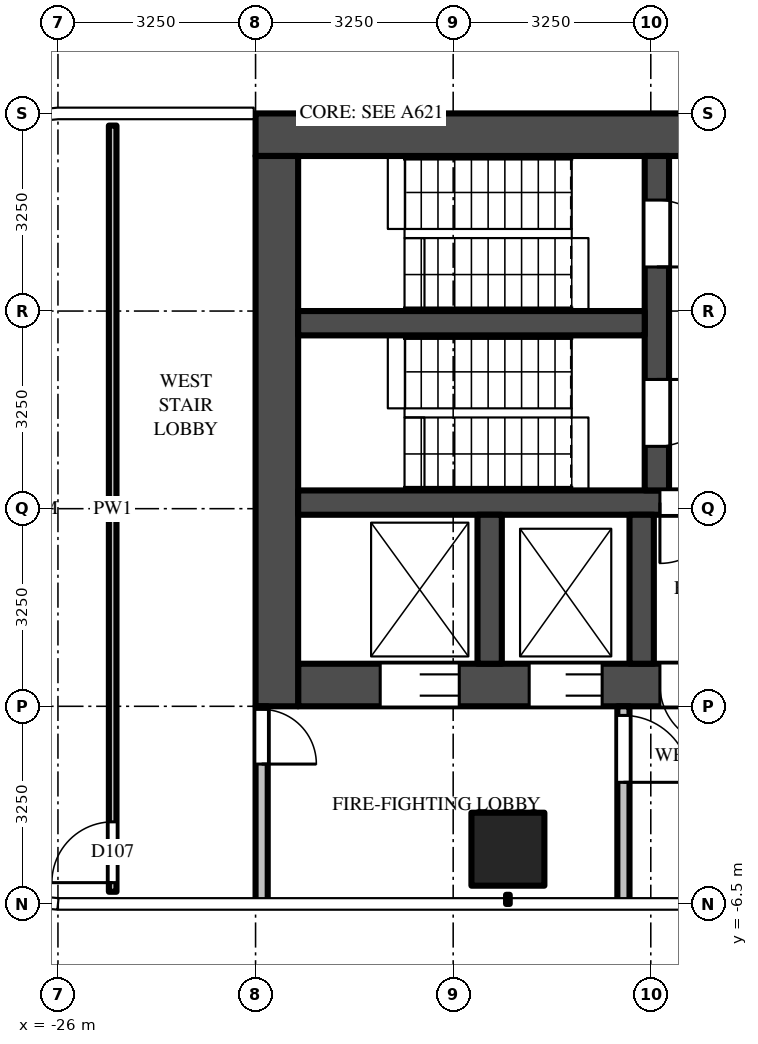
"""IFC4 building model, lengths in metres.
Left out: names, types, materials, properties, quantities, classifications, styles, units other than length and angle.
Written with IfcOpenShell. Run it as: python <this file> out.ifc"""

import sys

from ifc_helpers import new_model, si_unit, direction, frame, frame_2d, origin, origin_2d, place, context, subcontext, project, spatial, rectangle, extrude, source, transform, mapped, element, fill, save


model = new_model("IFC4")
c1 = context("Model", 3, precision=1e-05, world=origin(), true_north=direction((0.0, 1.0)))
c2 = subcontext(c1, "Body", "Model", "MODEL_VIEW")
j1 = project(units=[si_unit("LENGTHUNIT", "METRE"), si_unit("PLANEANGLEUNIT", "RADIAN")], contexts=[c1])
p1 = place(None, origin())
s1 = spatial("IfcSite", under=j1, at=p1, CompositionType="ELEMENT")
p2 = place(p1, origin())
s2 = spatial("IfcBuilding", under=s1, at=p2, CompositionType="ELEMENT")
p3 = place(p2, frame((0.0, 0.0, 181.5)))
s3 = spatial("IfcBuildingStorey", under=s2, at=p3, CompositionType="ELEMENT", Elevation=181.5)
m1 = source(origin(), c2, "Body", "SweptSolid", [
    extrude(rectangle(XDim=1.2, YDim=1.2, at=origin_2d()), origin(), (0.0, 0.0, 1.0), 3.9),
])
p4 = place(p3, frame((-18.6, -5.6, 0.0), z_axis=(0.0, 0.0, 1.0), x_axis=(1.0, 0.0, 0.0)))
e1 = element("IfcColumn", 1, at=p4, inside=s3, PredefinedType="COLUMN", context=c2, shape_type="MappedRepresentation", body=[
    mapped(m1, transform((0.0, 0.0, 0.0))),
])
m2 = source(origin(), c2, "Body", "SweptSolid", [
    extrude(rectangle(XDim=16.55, YDim=0.7, at=frame_2d((8.275, 0.0))), origin(), (0.0, 0.0, 1.0), 3.7),
])
p5 = place(p3, frame((-6.2, 6.15, 0.0), z_axis=(0.0, 0.0, 1.0), x_axis=(-1.0, 0.0, 0.0)))
e2 = element("IfcWall", 2, at=p5, inside=s3, PredefinedType="SHEAR", context=c2, shape_type="MappedRepresentation", body=[
    mapped(m2, transform((0.0, 0.0, 0.0))),
])
m3 = source(origin(), c2, "Body", "SweptSolid", [
    extrude(rectangle(XDim=14.85, YDim=0.7, at=frame_2d((7.425, 0.0))), origin(), (0.0, 0.0, 1.0), 3.7),
])
p6 = place(p3, frame((-7.2, -2.9, 0.0), z_axis=(0.0, 0.0, 1.0), x_axis=(-1.0, 0.0, 0.0)))
e3 = element("IfcWall", 3, at=p6, inside=s3, PredefinedType="SHEAR", context=c2, shape_type="MappedRepresentation", body=[
    mapped(m3, transform((0.0, 0.0, 0.0))),
])
m4 = source(origin(), c2, "Body", "SweptSolid", [
    extrude(rectangle(XDim=1.1, YDim=2.1, at=frame_2d((0.55, 1.05))), frame((0.0, 0.36, 0.0), z_axis=(0.0, -1.0, 0.0), x_axis=(1.0, 0.0, 0.0)), (0.0, 0.0, 1.0), 0.72),
])
p7 = place(p6, frame((0.55, 0.0, 0.0)))
e4 = element("IfcOpeningElement", 4, at=p7, cuts=e3, PredefinedType="OPENING", context=c2, shape_type="MappedRepresentation", body=[
    mapped(m4, transform((0.0, 0.0, 0.0))),
])
p8 = place(p6, frame((3.15, 0.0, 0.0)))
e5 = element("IfcOpeningElement", 5, at=p8, cuts=e3, PredefinedType="OPENING", context=c2, shape_type="MappedRepresentation", body=[
    mapped(m4, transform((0.0, 0.0, 0.0))),
])
m5 = source(origin(), c2, "Body", "SweptSolid", [
    extrude(rectangle(XDim=1.2, YDim=2.1, at=frame_2d((0.6, 1.05))), frame((0.0, 0.36, 0.0), z_axis=(0.0, -1.0, 0.0), x_axis=(1.0, 0.0, 0.0)), (0.0, 0.0, 1.0), 0.72),
])
p9 = place(p6, frame((5.7, 0.0, 0.0)))
e6 = element("IfcOpeningElement", 6, at=p9, cuts=e3, PredefinedType="OPENING", context=c2, shape_type="MappedRepresentation", body=[
    mapped(m5, transform((0.0, 0.0, 0.0))),
])
m6 = source(origin(), c2, "Body", "SweptSolid", [
    extrude(rectangle(XDim=1.3, YDim=2.1, at=frame_2d((0.65, 1.05))), frame((0.0, 0.36, 0.0), z_axis=(0.0, -1.0, 0.0), x_axis=(1.0, 0.0, 0.0)), (0.0, 0.0, 1.0), 0.72),
])
p10 = place(p6, frame((12.2, 0.0, 0.0)))
e7 = element("IfcOpeningElement", 7, at=p10, cuts=e3, PredefinedType="OPENING", context=c2, shape_type="MappedRepresentation", body=[
    mapped(m6, transform((0.0, 0.0, 0.0))),
])
p11 = place(p6, frame((9.85, 0.0, 0.0)))
e8 = element("IfcOpeningElement", 8, at=p11, cuts=e3, PredefinedType="OPENING", context=c2, shape_type="MappedRepresentation", body=[
    mapped(m5, transform((0.0, 0.0, 0.0))),
])
m7 = source(origin(), c2, "Body", "SweptSolid", [
    extrude(rectangle(XDim=1.0, YDim=2.1, at=frame_2d((0.5, 1.05))), frame((0.0, 0.36, 0.0), z_axis=(0.0, -1.0, 0.0), x_axis=(1.0, 0.0, 0.0)), (0.0, 0.0, 1.0), 0.72),
])
p12 = place(p6, frame((7.9, 0.0, 0.0)))
e9 = element("IfcOpeningElement", 9, at=p12, cuts=e3, PredefinedType="OPENING", context=c2, shape_type="MappedRepresentation", body=[
    mapped(m7, transform((0.0, 0.0, 0.0))),
])
m8 = source(origin(), c2, "Body", "SweptSolid", [
    extrude(rectangle(XDim=9.05, YDim=0.7, at=frame_2d((4.525, 0.0))), origin(), (0.0, 0.0, 1.0), 3.7),
])
p13 = place(p3, frame((-22.4, 5.8, 0.0), z_axis=(0.0, 0.0, 1.0), x_axis=(0.0, -1.0, 0.0)))
e10 = element("IfcWall", 10, at=p13, inside=s3, PredefinedType="SHEAR", context=c2, shape_type="MappedRepresentation", body=[
    mapped(m8, transform((0.0, 0.0, 0.0))),
])
m9 = source(origin(), c2, "Body", "SweptSolid", [
    extrude(rectangle(XDim=14.85, YDim=0.4, at=frame_2d((7.425, 0.0))), origin(), (0.0, 0.0, 1.0), 3.7),
])
p14 = place(p3, frame((-7.2, 0.1, 0.0), z_axis=(0.0, 0.0, 1.0), x_axis=(-1.0, 0.0, 0.0)))
e11 = element("IfcWall", 11, at=p14, inside=s3, PredefinedType="SHEAR", context=c2, shape_type="MappedRepresentation", body=[
    mapped(m9, transform((0.0, 0.0, 0.0))),
])
m10 = source(origin(), c2, "Body", "SweptSolid", [
    extrude(rectangle(XDim=1.0, YDim=2.1, at=frame_2d((0.5, 1.05))), frame((0.0, 0.21, 0.0), z_axis=(0.0, -1.0, 0.0), x_axis=(1.0, 0.0, 0.0)), (0.0, 0.0, 1.0), 0.42),
])
p15 = place(p14, frame((7.9, 0.0, 0.0)))
e12 = element("IfcOpeningElement", 12, at=p15, cuts=e11, PredefinedType="OPENING", context=c2, shape_type="MappedRepresentation", body=[
    mapped(m10, transform((0.0, 0.0, 0.0))),
])
m11 = source(origin(), c2, "Body", "SweptSolid", [
    extrude(rectangle(XDim=5.5, YDim=0.4, at=frame_2d((2.75, 0.0))), origin(), (0.0, 0.0, 1.0), 3.7),
])
p16 = place(p3, frame((-16.15, 5.8, 0.0), z_axis=(0.0, 0.0, 1.0), x_axis=(0.0, -1.0, 0.0)))
e13 = element("IfcWall", 13, at=p16, inside=s3, PredefinedType="SHEAR", context=c2, shape_type="MappedRepresentation", body=[
    mapped(m11, transform((0.0, 0.0, 0.0))),
])
m12 = source(origin(), c2, "Body", "SweptSolid", [
    extrude(rectangle(XDim=1.1, YDim=2.1, at=frame_2d((0.55, 1.05))), frame((0.0, 0.21, 0.0), z_axis=(0.0, -1.0, 0.0), x_axis=(1.0, 0.0, 0.0)), (0.0, 0.0, 1.0), 0.42),
])
p17 = place(p16, frame((0.725, 0.0, 0.0)))
e14 = element("IfcOpeningElement", 14, at=p17, cuts=e13, PredefinedType="OPENING", context=c2, shape_type="MappedRepresentation", body=[
    mapped(m12, transform((0.0, 0.0, 0.0))),
])
p18 = place(p16, frame((3.675, 0.0, 0.0)))
e15 = element("IfcOpeningElement", 15, at=p18, cuts=e13, PredefinedType="OPENING", context=c2, shape_type="MappedRepresentation", body=[
    mapped(m12, transform((0.0, 0.0, 0.0))),
])
m13 = source(origin(), c2, "Body", "SweptSolid", [
    extrude(rectangle(XDim=5.7, YDim=0.4, at=frame_2d((2.85, 0.0))), origin(), (0.0, 0.0, 1.0), 3.7),
])
p19 = place(p3, frame((-16.35, 3.05, 0.0), z_axis=(0.0, 0.0, 1.0), x_axis=(-1.0, 0.0, 0.0)))
e16 = element("IfcWall", 16, at=p19, inside=s3, PredefinedType="SHEAR", context=c2, shape_type="MappedRepresentation", body=[
    mapped(m13, transform((0.0, 0.0, 0.0))),
])
m14 = source(origin(), c2, "Body", "SweptSolid", [
    extrude(rectangle(XDim=2.45, YDim=0.4, at=frame_2d((1.225, 0.0))), origin(), (0.0, 0.0, 1.0), 3.7),
])
for number, where, z_axis, x_axis in (
    (17, (-16.4, -0.1, 0.0), (0.0, 0.0, 1.0), (0.0, -1.0, 0.0)),
    (18, (-18.9, -0.1, 0.0), (0.0, 0.0, 1.0), (0.0, -1.0, 0.0)),
):
    element("IfcWall", number, at=place(p3, frame(where, z_axis=z_axis, x_axis=x_axis)), inside=s3, PredefinedType="SHEAR", context=c2, shape_type="MappedRepresentation", body=[
        mapped(m14, transform((0.0, 0.0, 0.0))),
    ])
m15 = source(origin(), c2, "Body", "SweptSolid", [
    extrude(rectangle(XDim=3.25, YDim=0.2, at=frame_2d((1.625, 0.0))), origin(), (0.0, 0.0, 1.0), 3.7),
])
p20 = place(p3, frame((-16.7, -3.25, 0.0), z_axis=(0.0, 0.0, 1.0), x_axis=(0.0, -1.0, 0.0)))
e19 = element("IfcWall", 19, at=p20, inside=s3, PredefinedType="PARTITIONING", context=c2, shape_type="MappedRepresentation", body=[
    mapped(m15, transform((0.0, 0.0, 0.0))),
])
m16 = source(origin(), c2, "Body", "SweptSolid", [
    extrude(rectangle(XDim=1.1, YDim=2.1, at=frame_2d((0.55, 1.05))), frame((0.0, 0.11, 0.0), z_axis=(0.0, -1.0, 0.0), x_axis=(1.0, 0.0, 0.0)), (0.0, 0.0, 1.0), 0.22),
])
p21 = place(p20, frame((0.15, 0.0, 0.0)))
e20 = element("IfcOpeningElement", 20, at=p21, cuts=e19, PredefinedType="OPENING", context=c2, shape_type="MappedRepresentation", body=[
    mapped(m16, transform((0.0, 0.0, 0.0))),
])
p22 = place(p3, frame((-22.65, -3.25, 0.0), z_axis=(0.0, 0.0, 1.0), x_axis=(0.0, -1.0, 0.0)))
e21 = element("IfcWall", 21, at=p22, inside=s3, PredefinedType="PARTITIONING", context=c2, shape_type="MappedRepresentation", body=[
    mapped(m15, transform((0.0, 0.0, 0.0))),
])
m17 = source(origin(), c2, "Body", "SweptSolid", [
    extrude(rectangle(XDim=0.9, YDim=2.1, at=frame_2d((0.45, 1.05))), frame((0.0, 0.11, 0.0), z_axis=(0.0, -1.0, 0.0), x_axis=(1.0, 0.0, 0.0)), (0.0, 0.0, 1.0), 0.22),
])
p23 = place(p22, frame((0.05, 0.0, 0.0)))
e22 = element("IfcOpeningElement", 22, at=p23, cuts=e21, PredefinedType="OPENING", context=c2, shape_type="MappedRepresentation", body=[
    mapped(m17, transform((0.0, 0.0, 0.0))),
])
m18 = source(origin(), c2, "Body", "SweptSolid", [
    extrude(rectangle(XDim=12.6, YDim=0.125, at=frame_2d((6.3, 0.0))), origin(), (0.0, 0.0, 1.0), 2.78),
])
p24 = place(p3, frame((-25.1, -6.3, 0.0), z_axis=(0.0, 0.0, 1.0), x_axis=(0.0, 1.0, 0.0)))
e23 = element("IfcWall", 23, at=p24, inside=s3, PredefinedType="PARTITIONING", context=c2, shape_type="MappedRepresentation", body=[
    mapped(m18, transform((0.0, 0.0, 0.0))),
])
m19 = source(origin(), c2, "Body", "SweptSolid", [
    extrude(rectangle(XDim=1.0, YDim=2.1, at=frame_2d((0.5, 1.05))), frame((0.0, 0.073, 0.0), z_axis=(0.0, -1.0, 0.0), x_axis=(1.0, 0.0, 0.0)), (0.0, 0.0, 1.0), 0.145),
])
p25 = place(p24, frame((0.15, 0.0, 0.0)))
e24 = element("IfcOpeningElement", 24, at=p25, cuts=e23, PredefinedType="OPENING", context=c2, shape_type="MappedRepresentation", body=[
    mapped(m19, transform((0.0, 0.0, 0.0))),
])
m20 = source(origin(), c2, "Body", "SweptSolid", [
    extrude(rectangle(XDim=1.3, YDim=2.1, at=frame_2d((0.65, 1.05))), frame((0.0, -0.275, 0.0), z_axis=(0.0, -1.0, 0.0), x_axis=(1.0, 0.0, 0.0)), (0.0, 0.0, 1.0), 0.05),
])
p26 = place(p10, origin())
e25 = element("IfcDoor", 25, at=p26, inside=s3, OperationType="DOUBLE_DOOR_SLIDING", PredefinedType="DOOR", context=c2, shape_type="MappedRepresentation", body=[
    mapped(m20, transform((0.0, 0.0, 0.0))),
])
fill(e7, e25)
m21 = source(origin(), c2, "Body", "SweptSolid", [
    extrude(rectangle(XDim=1.2, YDim=2.1, at=frame_2d((0.6, 1.05))), frame((0.0, -0.275, 0.0), z_axis=(0.0, -1.0, 0.0), x_axis=(1.0, 0.0, 0.0)), (0.0, 0.0, 1.0), 0.05),
])
p27 = place(p11, origin())
e26 = element("IfcDoor", 26, at=p27, inside=s3, OperationType="DOUBLE_DOOR_SLIDING", PredefinedType="DOOR", context=c2, shape_type="MappedRepresentation", body=[
    mapped(m21, transform((0.0, 0.0, 0.0))),
])
fill(e8, e26)
m22 = source(origin(), c2, "Body", "SweptSolid", [
    extrude(rectangle(XDim=1.1, YDim=2.1, at=frame_2d((0.55, 1.05))), frame((0.0, 0.025, 0.0), z_axis=(0.0, -1.0, 0.0), x_axis=(1.0, 0.0, 0.0)), (0.0, 0.0, 1.0), 0.05),
])
p28 = place(p17, origin())
e27 = element("IfcDoor", 27, at=p28, inside=s3, OperationType="SINGLE_SWING_RIGHT", PredefinedType="DOOR", context=c2, shape_type="MappedRepresentation", body=[
    mapped(m22, transform((0.0, 0.0, 0.0))),
])
fill(e14, e27)
p29 = place(p18, origin())
e28 = element("IfcDoor", 28, at=p29, inside=s3, OperationType="SINGLE_SWING_LEFT", PredefinedType="DOOR", context=c2, shape_type="MappedRepresentation", body=[
    mapped(m22, transform((0.0, 0.0, 0.0))),
])
fill(e15, e28)
m23 = source(origin(), c2, "Body", "SweptSolid", [
    extrude(rectangle(XDim=1.0, YDim=2.1, at=frame_2d((0.5, 1.05))), frame((0.0, 0.025, 0.0), z_axis=(0.0, -1.0, 0.0), x_axis=(1.0, 0.0, 0.0)), (0.0, 0.0, 1.0), 0.05),
])
p30 = place(p15, origin())
e29 = element("IfcDoor", 29, at=p30, inside=s3, OperationType="SINGLE_SWING_RIGHT", PredefinedType="DOOR", context=c2, shape_type="MappedRepresentation", body=[
    mapped(m23, transform((0.0, 0.0, 0.0))),
])
fill(e12, e29)
m24 = source(origin(), c2, "Body", "SweptSolid", [
    extrude(rectangle(XDim=1.0, YDim=2.1, at=frame_2d((0.5, 1.05))), frame((0.0, -0.275, 0.0), z_axis=(0.0, -1.0, 0.0), x_axis=(1.0, 0.0, 0.0)), (0.0, 0.0, 1.0), 0.05),
])
p31 = place(p12, origin())
e30 = element("IfcDoor", 30, at=p31, inside=s3, OperationType="SINGLE_SWING_LEFT", PredefinedType="DOOR", context=c2, shape_type="MappedRepresentation", body=[
    mapped(m24, transform((0.0, 0.0, 0.0))),
])
fill(e9, e30)
p32 = place(p21, origin())
e31 = element("IfcDoor", 31, at=p32, inside=s3, OperationType="SINGLE_SWING_RIGHT", PredefinedType="DOOR", context=c2, shape_type="MappedRepresentation", body=[
    mapped(m22, transform((0.0, 0.0, 0.0))),
])
fill(e20, e31)
m25 = source(origin(), c2, "Body", "SweptSolid", [
    extrude(rectangle(XDim=0.9, YDim=2.1, at=frame_2d((0.45, 1.05))), frame((0.0, 0.025, 0.0), z_axis=(0.0, -1.0, 0.0), x_axis=(1.0, 0.0, 0.0)), (0.0, 0.0, 1.0), 0.05),
])
p33 = place(p23, origin())
e32 = element("IfcDoor", 32, at=p33, inside=s3, OperationType="SINGLE_SWING_RIGHT", PredefinedType="DOOR", context=c2, shape_type="MappedRepresentation", body=[
    mapped(m25, transform((0.0, 0.0, 0.0))),
])
fill(e22, e32)
p34 = place(p25, origin())
e33 = element("IfcDoor", 33, at=p34, inside=s3, OperationType="SINGLE_SWING_LEFT", PredefinedType="DOOR", context=c2, shape_type="MappedRepresentation", body=[
    mapped(m23, transform((0.0, 0.0, 0.0))),
])
fill(e24, e33)
save(model, sys.argv[1])
